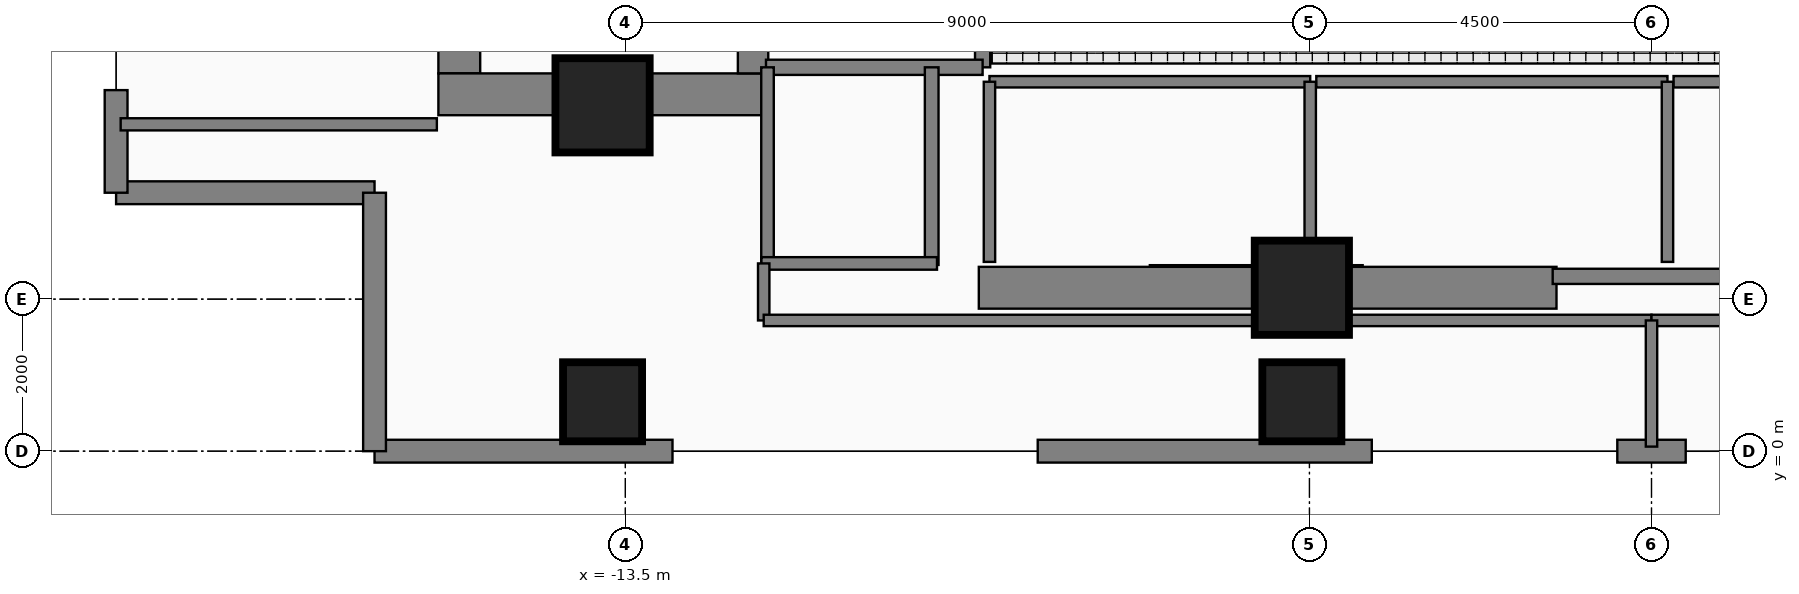
"""IFC4 building model, lengths in metres.
Left out: names, types, materials, properties, quantities, classifications, styles, units other than length and angle.
Written with IfcOpenShell. Run it as: python <this file> out.ifc"""

import sys

from ifc_helpers import new_model, si_unit, direction, frame, frame_2d, origin, origin_2d, place, context, subcontext, project, spatial, rectangle, extrude, element, fill, save


model = new_model("IFC4")
c1 = context("Model", 3, precision=1e-05, world=origin(), true_north=direction((0.0, 1.0)))
c2 = subcontext(c1, "Body", "Model", "MODEL_VIEW")
j1 = project(units=[si_unit("LENGTHUNIT", "METRE"), si_unit("PLANEANGLEUNIT", "RADIAN")], contexts=[c1])
p1 = place(None, origin())
s1 = spatial("IfcSite", under=j1, at=p1, CompositionType="ELEMENT")
p2 = place(p1, origin())
s2 = spatial("IfcBuilding", under=s1, at=p2, CompositionType="ELEMENT")
p3 = place(p2, frame((0.0, 0.0, 284.05)))
s3 = spatial("IfcBuildingStorey", under=s2, at=p3, CompositionType="ELEMENT", Elevation=284.05)
p4 = place(p3, frame((-15.685, 4.97, 0.0), z_axis=(0.0, 0.0, 1.0), x_axis=(0.0, 1.0, 0.0)))
e1 = element("IfcWall", 1, at=p4, inside=s3, PredefinedType="SHEAR", context=c2, shape_type="SweptSolid", body=[
    extrude(rectangle(XDim=8.96, YDim=0.55, at=frame_2d((4.48, 0.0))), origin(), (0.0, 0.0, 1.0), 4.21),
])
p5 = place(p3, frame((-15.96, 4.695, 0.0), z_axis=(0.0, 0.0, 1.0), x_axis=(1.0, 0.0, 0.0)))
e2 = element("IfcWall", 2, at=p5, inside=s3, PredefinedType="SHEAR", context=c2, shape_type="SweptSolid", body=[
    extrude(rectangle(XDim=4.36, YDim=0.55, at=frame_2d((2.18, 0.0))), origin(), (0.0, 0.0, 1.0), 4.21),
])
p6 = place(p3, frame((-8.85, 2.15, 0.0), z_axis=(0.0, 0.0, 1.0), x_axis=(1.0, 0.0, 0.0)))
e3 = element("IfcWall", 3, at=p6, inside=s3, PredefinedType="SHEAR", context=c2, shape_type="SweptSolid", body=[
    extrude(rectangle(XDim=7.6, YDim=0.55, at=frame_2d((3.8, 0.0))), origin(), (0.0, 0.0, 1.0), 4.18),
])
p7 = place(p3, frame((-11.82, 4.97, 0.0), z_axis=(0.0, 0.0, 1.0), x_axis=(0.0, 1.0, 0.0)))
e4 = element("IfcWall", 4, at=p7, inside=s3, PredefinedType="SHEAR", context=c2, shape_type="SweptSolid", body=[
    extrude(rectangle(XDim=8.96, YDim=0.4, at=frame_2d((4.48, 0.0))), origin(), (0.0, 0.0, 1.0), 4.21),
])
p8 = place(p7, frame((0.31, 0.0, 0.0)))
e5 = element("IfcOpeningElement", 5, at=p8, cuts=e4, PredefinedType="OPENING", context=c2, shape_type="SweptSolid", body=[
    extrude(rectangle(XDim=1.12, YDim=2.22, at=frame_2d((0.56, 1.11))), frame((0.0, 0.21, 0.0), z_axis=(0.0, -1.0, 0.0), x_axis=(1.0, 0.0, 0.0)), (0.0, 0.0, 1.0), 0.42),
])
for number, where, z_axis, x_axis in (
    (6, (-13.8, 4.55, 0.0), (0.0, 0.0, 1.0), (1.0, 0.0, 0.0)),
    (7, (-4.6, 2.15, 0.0), (0.0, 0.0, 1.0), (1.0, 0.0, 0.0)),
):
    element("IfcColumn", number, at=place(p3, frame(where, z_axis=z_axis, x_axis=x_axis)), inside=s3, PredefinedType="COLUMN", context=c2, shape_type="SweptSolid", body=[
        extrude(rectangle(XDim=1.2, YDim=1.2, at=origin_2d()), origin(), (0.0, 0.0, 1.0), 4.4),
    ])
for number, where, z_axis, x_axis in (
    (8, (-13.8, 0.65, 0.0), (0.0, 0.0, 1.0), (1.0, 0.0, 0.0)),
    (9, (-4.6, 0.65, 0.0), (0.0, 0.0, 1.0), (1.0, 0.0, 0.0)),
):
    element("IfcColumn", number, at=place(p3, frame(where, z_axis=z_axis, x_axis=x_axis)), inside=s3, PredefinedType="COLUMN", context=c2, shape_type="SweptSolid", body=[
        extrude(rectangle(XDim=1.0, YDim=1.0, at=origin_2d()), origin(), (0.0, 0.0, 1.0), 4.4),
    ])
p9 = place(p3, frame((-16.8, 3.4, 0.0), z_axis=(0.0, 0.0, 1.0), x_axis=(-1.0, 0.0, 0.0)))
e10 = element("IfcWall", 10, at=p9, inside=s3, PredefinedType="STANDARD", context=c2, shape_type="SweptSolid", body=[
    extrude(rectangle(XDim=3.4, YDim=0.3, at=frame_2d((1.7, 0.0))), origin(), (0.0, 0.0, 1.0), 4.18),
])
p10 = place(p9, frame((1.125, 0.0, 1.25)))
e11 = element("IfcOpeningElement", 11, at=p10, cuts=e10, PredefinedType="OPENING", context=c2, shape_type="SweptSolid", body=[
    extrude(rectangle(XDim=1.15, YDim=1.55, at=frame_2d((0.575, 0.775))), frame((0.0, 0.16, 0.0), z_axis=(0.0, -1.0, 0.0), x_axis=(1.0, 0.0, 0.0)), (0.0, 0.0, 1.0), 0.32),
])
p11 = place(p3, frame((-20.2, 3.4, 0.0), z_axis=(0.0, 0.0, 1.0), x_axis=(0.0, 1.0, 0.0)))
e12 = element("IfcWall", 12, at=p11, inside=s3, PredefinedType="STANDARD", context=c2, shape_type="SweptSolid", body=[
    extrude(rectangle(XDim=1.35, YDim=0.3, at=frame_2d((0.675, 0.0))), origin(), (0.0, 0.0, 1.0), 4.18),
])
p12 = place(p3, frame((0.45, 0.0, 0.0), z_axis=(0.0, 0.0, 1.0), x_axis=(-1.0, 0.0, 0.0)))
e13 = element("IfcWall", 13, at=p12, inside=s3, PredefinedType="STANDARD", context=c2, shape_type="SweptSolid", body=[
    extrude(rectangle(XDim=0.9, YDim=0.3, at=frame_2d((0.45, 0.0))), origin(), (0.0, 0.0, 1.0), 4.18),
])
p13 = place(p3, frame((-3.68, 0.0, 0.0), z_axis=(0.0, 0.0, 1.0), x_axis=(-1.0, 0.0, 0.0)))
e14 = element("IfcWall", 14, at=p13, inside=s3, PredefinedType="STANDARD", context=c2, shape_type="SweptSolid", body=[
    extrude(rectangle(XDim=4.395, YDim=0.3, at=frame_2d((2.198, 0.0))), origin(), (0.0, 0.0, 1.0), 4.18),
])
p14 = place(p13, frame((2.695, 0.0, 0.0)))
e15 = element("IfcOpeningElement", 15, at=p14, cuts=e14, PredefinedType="OPENING", context=c2, shape_type="SweptSolid", body=[
    extrude(rectangle(XDim=1.05, YDim=2.2, at=frame_2d((0.525, 1.1))), frame((0.0, 0.16, 0.0), z_axis=(0.0, -1.0, 0.0), x_axis=(1.0, 0.0, 0.0)), (0.0, 0.0, 1.0), 0.32),
])
p15 = place(p3, frame((-12.88, 0.0, 0.0), z_axis=(0.0, 0.0, 1.0), x_axis=(-1.0, 0.0, 0.0)))
e16 = element("IfcWall", 16, at=p15, inside=s3, PredefinedType="STANDARD", context=c2, shape_type="SweptSolid", body=[
    extrude(rectangle(XDim=3.92, YDim=0.3, at=frame_2d((1.96, 0.0))), origin(), (0.0, 0.0, 1.0), 4.18),
])
p16 = place(p15, frame((2.075, 0.0, 0.95)))
e17 = element("IfcOpeningElement", 17, at=p16, cuts=e16, PredefinedType="OPENING", context=c2, shape_type="SweptSolid", body=[
    extrude(rectangle(XDim=1.15, YDim=1.55, at=frame_2d((0.575, 0.775))), frame((0.0, 0.16, 0.0), z_axis=(0.0, -1.0, 0.0), x_axis=(1.0, 0.0, 0.0)), (0.0, 0.0, 1.0), 0.32),
])
p17 = place(p3, frame((-16.8, 0.0, 0.0), z_axis=(0.0, 0.0, 1.0), x_axis=(0.0, 1.0, 0.0)))
e18 = element("IfcWall", 18, at=p17, inside=s3, PredefinedType="STANDARD", context=c2, shape_type="SweptSolid", body=[
    extrude(rectangle(XDim=3.4, YDim=0.3, at=frame_2d((1.7, 0.0))), origin(), (0.0, 0.0, 1.0), 4.18),
])
p18 = place(p17, frame((0.22, 0.0, 0.0)))
e19 = element("IfcOpeningElement", 19, at=p18, cuts=e18, PredefinedType="OPENING", context=c2, shape_type="SweptSolid", body=[
    extrude(rectangle(XDim=1.05, YDim=2.2, at=frame_2d((0.525, 1.1))), frame((0.0, 0.16, 0.0), z_axis=(0.0, -1.0, 0.0), x_axis=(1.0, 0.0, 0.0)), (0.0, 0.0, 1.0), 0.32),
])
p19 = place(p3, frame((-8.8, 5.05, 0.0), z_axis=(0.0, 0.0, 1.0), x_axis=(0.0, 1.0, 0.0)))
e20 = element("IfcWall", 20, at=p19, inside=s3, PredefinedType="PARTITIONING", context=c2, shape_type="SweptSolid", body=[
    extrude(rectangle(XDim=6.1, YDim=0.2, at=frame_2d((3.05, 0.0))), origin(), (0.0, 0.0, 1.0), 4.18),
])
p20 = place(p19, frame((0.25, 0.0, 0.0)))
e21 = element("IfcOpeningElement", 21, at=p20, cuts=e20, PredefinedType="OPENING", context=c2, shape_type="SweptSolid", body=[
    extrude(rectangle(XDim=1.1, YDim=2.2, at=frame_2d((0.55, 1.1))), frame((0.0, 0.11, 0.0), z_axis=(0.0, -1.0, 0.0), x_axis=(1.0, 0.0, 0.0)), (0.0, 0.0, 1.0), 0.22),
])
p21 = place(p19, frame((3.85, 0.0, 0.0)))
e22 = element("IfcOpeningElement", 22, at=p21, cuts=e20, PredefinedType="OPENING", context=c2, shape_type="SweptSolid", body=[
    extrude(rectangle(XDim=1.1, YDim=2.2, at=frame_2d((0.55, 1.1))), frame((0.0, 0.11, 0.0), z_axis=(0.0, -1.0, 0.0), x_axis=(1.0, 0.0, 0.0)), (0.0, 0.0, 1.0), 0.22),
])
p22 = place(p3, frame((-8.71, 4.86, 0.0), z_axis=(0.0, 0.0, 1.0), x_axis=(1.0, 0.0, 0.0)))
e23 = element("IfcWall", 23, at=p22, inside=s3, PredefinedType="PARTITIONING", context=c2, shape_type="SweptSolid", body=[
    extrude(rectangle(XDim=4.22, YDim=0.15, at=frame_2d((2.11, 0.0))), origin(), (0.0, 0.0, 1.0), 4.18),
])
p23 = place(p22, frame((1.66, 0.0, 0.0)))
e24 = element("IfcOpeningElement", 24, at=p23, cuts=e23, PredefinedType="OPENING", context=c2, shape_type="SweptSolid", body=[
    extrude(rectangle(XDim=0.9, YDim=2.15, at=frame_2d((0.45, 1.075))), frame((0.0, 0.085, 0.0), z_axis=(0.0, -1.0, 0.0), x_axis=(1.0, 0.0, 0.0)), (0.0, 0.0, 1.0), 0.17),
])
p24 = place(p3, frame((-4.41, 4.86, 0.0), z_axis=(0.0, 0.0, 1.0), x_axis=(1.0, 0.0, 0.0)))
e25 = element("IfcWall", 25, at=p24, inside=s3, PredefinedType="PARTITIONING", context=c2, shape_type="SweptSolid", body=[
    extrude(rectangle(XDim=4.62, YDim=0.15, at=frame_2d((2.31, 0.0))), origin(), (0.0, 0.0, 1.0), 4.18),
])
p25 = place(p24, frame((1.86, 0.0, 0.0)))
e26 = element("IfcOpeningElement", 26, at=p25, cuts=e25, PredefinedType="OPENING", context=c2, shape_type="SweptSolid", body=[
    extrude(rectangle(XDim=0.9, YDim=2.15, at=frame_2d((0.45, 1.075))), frame((0.0, 0.085, 0.0), z_axis=(0.0, -1.0, 0.0), x_axis=(1.0, 0.0, 0.0)), (0.0, 0.0, 1.0), 0.17),
])
p26 = place(p3, frame((0.29, 4.86, 0.0), z_axis=(0.0, 0.0, 1.0), x_axis=(1.0, 0.0, 0.0)))
e27 = element("IfcWall", 27, at=p26, inside=s3, PredefinedType="PARTITIONING", context=c2, shape_type="SweptSolid", body=[
    extrude(rectangle(XDim=3.42, YDim=0.15, at=frame_2d((1.71, 0.0))), origin(), (0.0, 0.0, 1.0), 4.18),
])
p27 = place(p26, frame((1.26, 0.0, 0.0)))
e28 = element("IfcOpeningElement", 28, at=p27, cuts=e27, PredefinedType="OPENING", context=c2, shape_type="SweptSolid", body=[
    extrude(rectangle(XDim=0.9, YDim=2.15, at=frame_2d((0.45, 1.075))), frame((0.0, 0.085, 0.0), z_axis=(0.0, -1.0, 0.0), x_axis=(1.0, 0.0, 0.0)), (0.0, 0.0, 1.0), 0.17),
])
p28 = place(p3, frame((-20.14, 4.3, 0.0), z_axis=(0.0, 0.0, 1.0), x_axis=(1.0, 0.0, 0.0)))
e29 = element("IfcWall", 29, at=p28, inside=s3, PredefinedType="PARTITIONING", context=c2, shape_type="SweptSolid", body=[
    extrude(rectangle(XDim=4.16, YDim=0.16, at=frame_2d((2.08, 0.0))), origin(), (0.0, 0.0, 1.0), 4.18),
])
p29 = place(p28, frame((1.605, 0.0, 0.0)))
e30 = element("IfcOpeningElement", 30, at=p29, cuts=e29, PredefinedType="OPENING", context=c2, shape_type="SweptSolid", body=[
    extrude(rectangle(XDim=0.95, YDim=2.15, at=frame_2d((0.475, 1.075))), frame((0.0, 0.09, 0.0), z_axis=(0.0, -1.0, 0.0), x_axis=(1.0, 0.0, 0.0)), (0.0, 0.0, 1.0), 0.18),
])
p30 = place(p3, frame((-11.65, 5.05, 0.0), z_axis=(0.0, 0.0, 1.0), x_axis=(1.0, 0.0, 0.0)))
e31 = element("IfcWall", 31, at=p30, inside=s3, PredefinedType="PARTITIONING", context=c2, shape_type="SweptSolid", body=[
    extrude(rectangle(XDim=2.85, YDim=0.2, at=frame_2d((1.425, 0.0))), origin(), (0.0, 0.0, 1.0), 4.18),
])
p31 = place(p3, frame((-1.3, 2.3, 0.0), z_axis=(0.0, 0.0, 1.0), x_axis=(1.0, 0.0, 0.0)))
e32 = element("IfcWall", 32, at=p31, inside=s3, PredefinedType="PARTITIONING", context=c2, shape_type="SweptSolid", body=[
    extrude(rectangle(XDim=2.6, YDim=0.2, at=frame_2d((1.3, 0.0))), origin(), (0.0, 0.0, 1.0), 3.08),
])
for number, where, z_axis, x_axis in (
    (33, (-8.71, 2.49, 0.0), (0.0, 0.0, 1.0), (0.0, 1.0, 0.0)),
    (34, (-4.49, 2.49, 0.0), (0.0, 0.0, 1.0), (0.0, 1.0, 0.0)),
    (35, (0.21, 2.49, 0.0), (0.0, 0.0, 1.0), (0.0, 1.0, 0.0)),
):
    element("IfcWall", number, at=place(p3, frame(where, z_axis=z_axis, x_axis=x_axis)), inside=s3, PredefinedType="PARTITIONING", context=c2, shape_type="SweptSolid", body=[
        extrude(rectangle(XDim=2.37, YDim=0.15, at=frame_2d((1.185, 0.0))), origin(), (0.0, 0.0, 1.0), 4.18),
    ])
p32 = place(p3, frame((-9.47, 2.45, 0.0), z_axis=(0.0, 0.0, 1.0), x_axis=(0.0, 1.0, 0.0)))
e36 = element("IfcWall", 36, at=p32, inside=s3, PredefinedType="PARTITIONING", context=c2, shape_type="SweptSolid", body=[
    extrude(rectangle(XDim=2.6, YDim=0.18, at=frame_2d((1.3, 0.0))), origin(), (0.0, 0.0, 1.0), 4.18),
])
p33 = place(p3, frame((-11.63, 2.47, 0.0), z_axis=(0.0, 0.0, 1.0), x_axis=(0.0, 1.0, 0.0)))
e37 = element("IfcWall", 37, at=p33, inside=s3, PredefinedType="PARTITIONING", context=c2, shape_type="SweptSolid", body=[
    extrude(rectangle(XDim=2.58, YDim=0.165, at=frame_2d((1.29, 0.0))), origin(), (0.0, 0.0, 1.0), 4.18),
])
p34 = place(p3, frame((-11.71, 2.47, 0.0), z_axis=(0.0, 0.0, 1.0), x_axis=(1.0, 0.0, 0.0)))
e38 = element("IfcWall", 38, at=p34, inside=s3, PredefinedType="PARTITIONING", context=c2, shape_type="SweptSolid", body=[
    extrude(rectangle(XDim=2.31, YDim=0.165, at=frame_2d((1.155, 0.0))), origin(), (0.0, 0.0, 1.0), 3.08),
])
p35 = place(p3, frame((-11.68, 1.72, 0.0), z_axis=(0.0, 0.0, 1.0), x_axis=(0.0, 1.0, 0.0)))
e39 = element("IfcWall", 39, at=p35, inside=s3, PredefinedType="PARTITIONING", context=c2, shape_type="SweptSolid", body=[
    extrude(rectangle(XDim=0.75, YDim=0.15, at=frame_2d((0.375, 0.0))), origin(), (0.0, 0.0, 1.0), 4.18),
])
for number, where, z_axis, x_axis in (
    (40, (-11.68, 1.72, 0.0), (0.0, 0.0, 1.0), (1.0, 0.0, 0.0)),
    (41, (0.0, 1.72, 0.0), (0.0, 0.0, 1.0), (1.0, 0.0, 0.0)),
):
    element("IfcWall", number, at=place(p3, frame(where, z_axis=z_axis, x_axis=x_axis)), inside=s3, PredefinedType="PARTITIONING", context=c2, shape_type="SweptSolid", body=[
        extrude(rectangle(XDim=11.68, YDim=0.15, at=frame_2d((5.84, 0.0))), origin(), (0.0, 0.0, 1.0), 3.08),
    ])
p36 = place(p3, frame((0.0, 0.06, 0.0), z_axis=(0.0, 0.0, 1.0), x_axis=(0.0, 1.0, 0.0)))
e42 = element("IfcWall", 42, at=p36, inside=s3, PredefinedType="PARTITIONING", context=c2, shape_type="SweptSolid", body=[
    extrude(rectangle(XDim=1.66, YDim=0.15, at=frame_2d((0.83, 0.0))), origin(), (0.0, 0.0, 1.0), 4.18),
])
p37 = place(p10, origin())
e43 = element("IfcWindow", 43, at=p37, inside=s3, PartitioningType="SINGLE_PANEL", PredefinedType="WINDOW", context=c2, shape_type="SweptSolid", body=[
    extrude(rectangle(XDim=1.15, YDim=1.55, at=frame_2d((0.575, 0.775))), frame((0.0, 0.03, 0.0), z_axis=(0.0, -1.0, 0.0), x_axis=(1.0, 0.0, 0.0)), (0.0, 0.0, 1.0), 0.06),
])
fill(e11, e43)
p38 = place(p14, origin())
e44 = element("IfcDoor", 44, at=p38, inside=s3, OperationType="SINGLE_SWING_RIGHT", PredefinedType="DOOR", context=c2, shape_type="SweptSolid", body=[
    extrude(rectangle(XDim=1.05, YDim=2.2, at=frame_2d((0.525, 1.1))), frame((0.0, 0.025, 0.0), z_axis=(0.0, -1.0, 0.0), x_axis=(1.0, 0.0, 0.0)), (0.0, 0.0, 1.0), 0.05),
])
fill(e15, e44)
p39 = place(p16, origin())
e45 = element("IfcWindow", 45, at=p39, inside=s3, PartitioningType="SINGLE_PANEL", PredefinedType="WINDOW", context=c2, shape_type="SweptSolid", body=[
    extrude(rectangle(XDim=1.15, YDim=1.55, at=frame_2d((0.575, 0.775))), frame((0.0, 0.03, 0.0), z_axis=(0.0, -1.0, 0.0), x_axis=(1.0, 0.0, 0.0)), (0.0, 0.0, 1.0), 0.06),
])
fill(e17, e45)
p40 = place(p18, origin())
e46 = element("IfcDoor", 46, at=p40, inside=s3, OperationType="SINGLE_SWING_LEFT", PredefinedType="DOOR", context=c2, shape_type="SweptSolid", body=[
    extrude(rectangle(XDim=1.05, YDim=2.2, at=frame_2d((0.525, 1.1))), frame((0.0, 0.025, 0.0), z_axis=(0.0, -1.0, 0.0), x_axis=(1.0, 0.0, 0.0)), (0.0, 0.0, 1.0), 0.05),
])
fill(e19, e46)
p41 = place(p23, origin())
e47 = element("IfcDoor", 47, at=p41, inside=s3, OperationType="SINGLE_SWING_LEFT", PredefinedType="DOOR", context=c2, shape_type="SweptSolid", body=[
    extrude(rectangle(XDim=0.9, YDim=2.15, at=frame_2d((0.45, 1.075))), frame((0.0, 0.025, 0.0), z_axis=(0.0, -1.0, 0.0), x_axis=(1.0, 0.0, 0.0)), (0.0, 0.0, 1.0), 0.05),
])
fill(e24, e47)
p42 = place(p25, origin())
e48 = element("IfcDoor", 48, at=p42, inside=s3, OperationType="SINGLE_SWING_RIGHT", PredefinedType="DOOR", context=c2, shape_type="SweptSolid", body=[
    extrude(rectangle(XDim=0.9, YDim=2.15, at=frame_2d((0.45, 1.075))), frame((0.0, 0.025, 0.0), z_axis=(0.0, -1.0, 0.0), x_axis=(1.0, 0.0, 0.0)), (0.0, 0.0, 1.0), 0.05),
])
fill(e26, e48)
p43 = place(p29, origin())
e49 = element("IfcDoor", 49, at=p43, inside=s3, OperationType="SINGLE_SWING_RIGHT", PredefinedType="DOOR", context=c2, shape_type="SweptSolid", body=[
    extrude(rectangle(XDim=0.95, YDim=2.15, at=frame_2d((0.475, 1.075))), frame((0.0, 0.025, 0.0), z_axis=(0.0, -1.0, 0.0), x_axis=(1.0, 0.0, 0.0)), (0.0, 0.0, 1.0), 0.05),
])
fill(e30, e49)
save(model, sys.argv[1])
